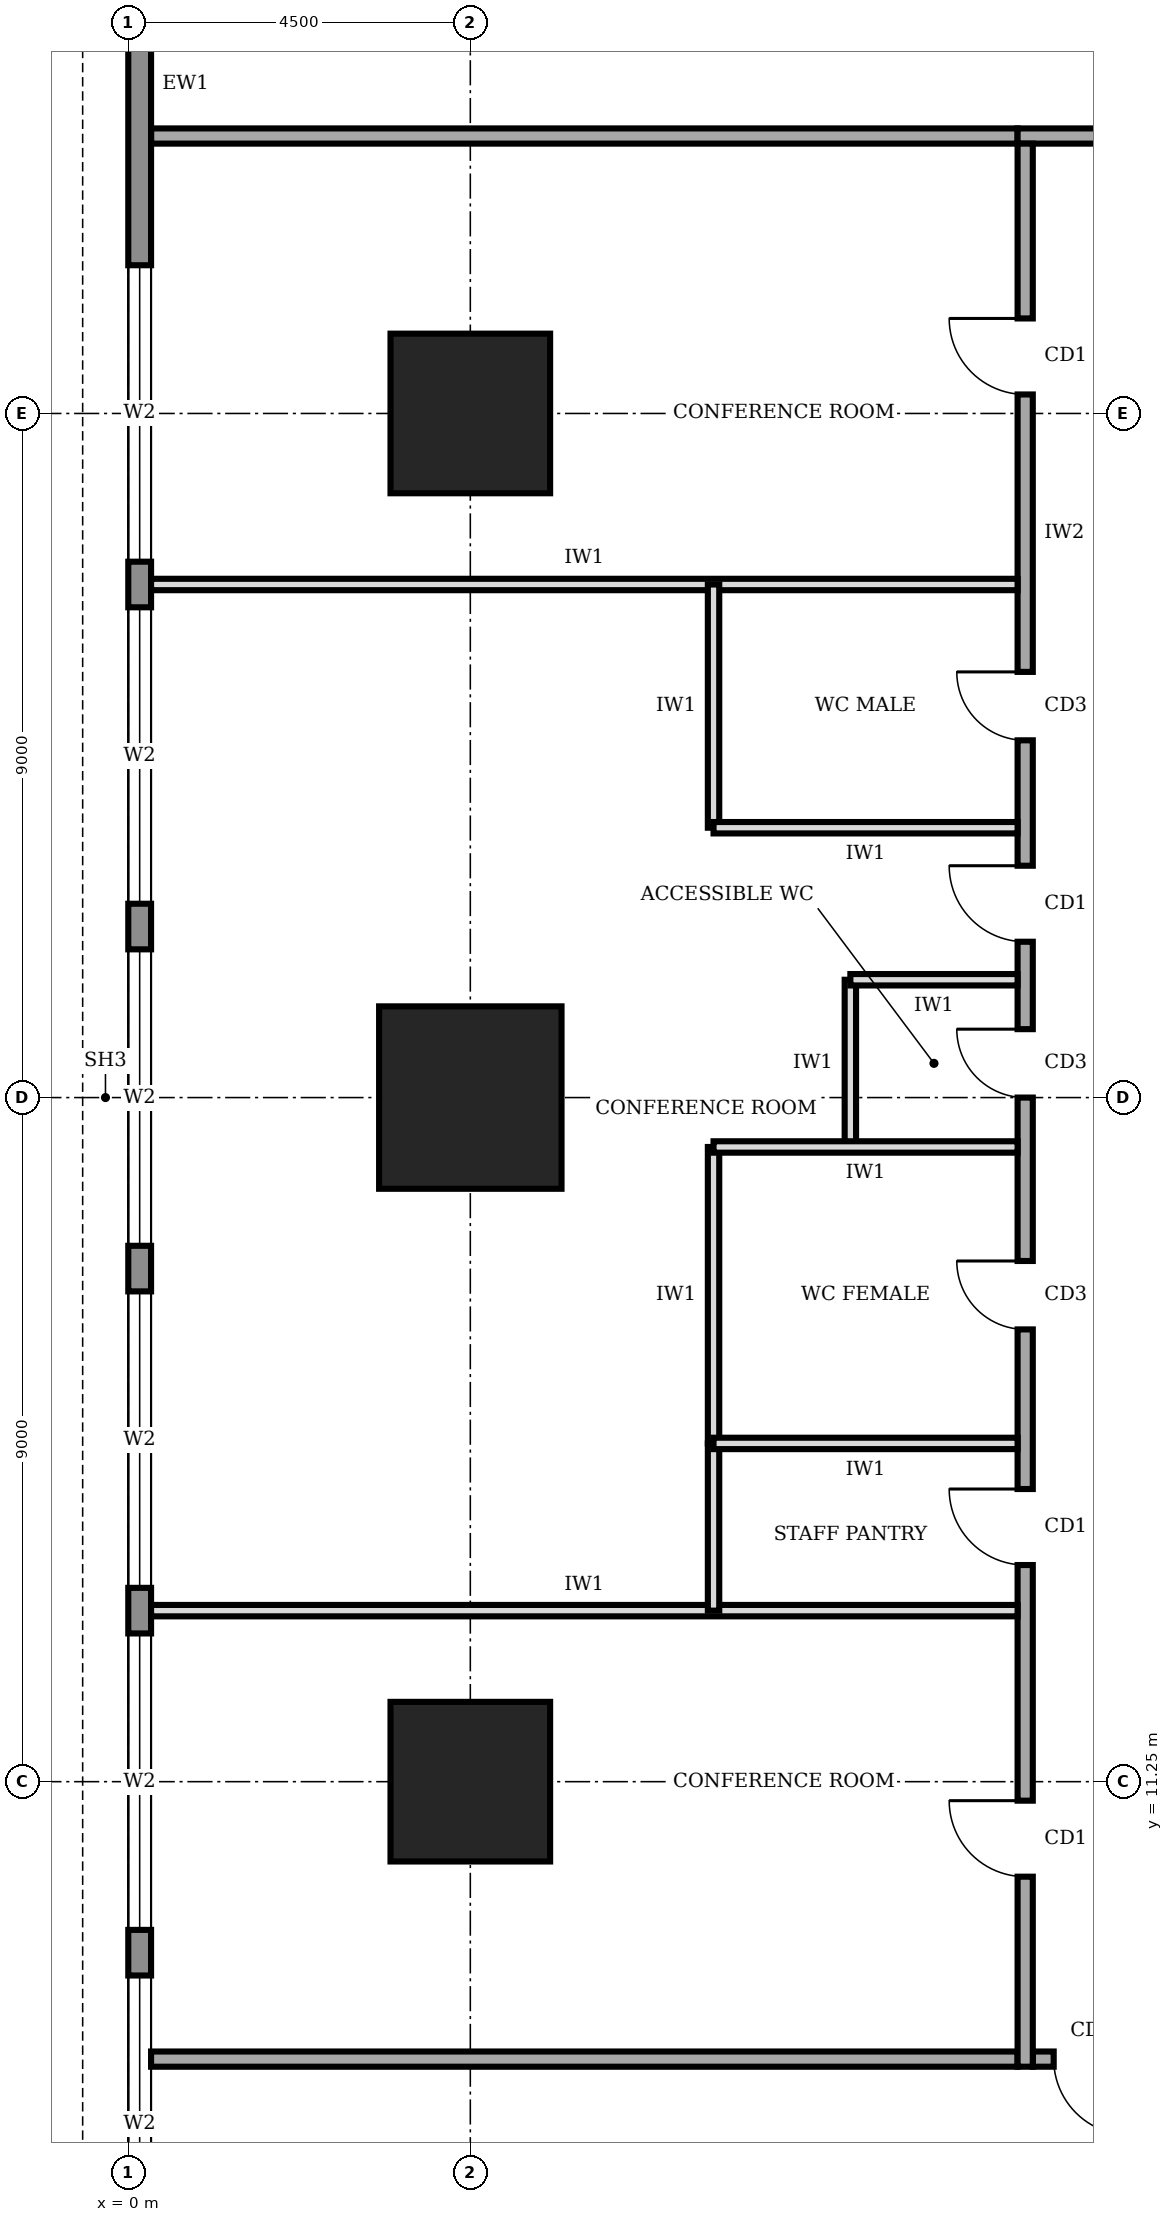
"""IFC4 building model, lengths in metres.
Left out: names, types, materials, properties, quantities, classifications, styles, units other than length and angle.
Written with IfcOpenShell. Run it as: python <this file> out.ifc"""

import sys

from ifc_helpers import new_model, si_unit, direction, frame, frame_2d, origin, origin_2d, place, context, subcontext, project, spatial, rectangle, extrude, element, fill, save


model = new_model("IFC4")
c1 = context("Model", 3, precision=1e-05, world=origin(), true_north=direction((0.0, 1.0)))
c2 = subcontext(c1, "Body", "Model", "MODEL_VIEW")
j1 = project(units=[si_unit("LENGTHUNIT", "METRE"), si_unit("PLANEANGLEUNIT", "RADIAN")], contexts=[c1])
p1 = place(None, origin())
s1 = spatial("IfcSite", under=j1, at=p1, CompositionType="ELEMENT")
p2 = place(p1, origin())
s2 = spatial("IfcBuilding", under=s1, at=p2, CompositionType="ELEMENT")
p3 = place(p2, frame((0.0, 0.0, 157.0)))
s3 = spatial("IfcBuildingStorey", under=s2, at=p3, CompositionType="ELEMENT", Elevation=157.0)
p4 = place(p3, frame((4.5, 11.25, 0.0), z_axis=(0.0, 0.0, 1.0), x_axis=(1.0, 0.0, 0.0)))
e1 = element("IfcColumn", 1, at=p4, inside=s3, PredefinedType="COLUMN", context=c2, shape_type="SweptSolid", body=[
    extrude(rectangle(XDim=2.1, YDim=2.1, at=origin_2d()), origin(), (0.0, 0.0, 1.0), 4.0),
])
p5 = place(p3, frame((4.5, 20.25, 0.0), z_axis=(0.0, 0.0, 1.0), x_axis=(1.0, 0.0, 0.0)))
e2 = element("IfcColumn", 2, at=p5, inside=s3, PredefinedType="COLUMN", context=c2, shape_type="SweptSolid", body=[
    extrude(rectangle(XDim=2.4, YDim=2.4, at=origin_2d()), origin(), (0.0, 0.0, 1.0), 4.0),
])
p6 = place(p3, frame((4.5, 29.25, 0.0), z_axis=(0.0, 0.0, 1.0), x_axis=(1.0, 0.0, 0.0)))
e3 = element("IfcColumn", 3, at=p6, inside=s3, PredefinedType="COLUMN", context=c2, shape_type="SweptSolid", body=[
    extrude(rectangle(XDim=2.1, YDim=2.1, at=origin_2d()), origin(), (0.0, 0.0, 1.0), 4.0),
])
p7 = place(p3, frame((0.15, 35.98, 0.0), z_axis=(0.0, 0.0, 1.0), x_axis=(0.0, -1.0, 0.0)))
e4 = element("IfcWall", 4, at=p7, inside=s3, PredefinedType="STANDARD", context=c2, shape_type="SweptSolid", body=[
    extrude(rectangle(XDim=31.46, YDim=0.3, at=frame_2d((15.73, 0.0))), origin(), (0.0, 0.0, 1.0), 3.75),
])
p8 = place(p7, frame((27.28, 0.0, 0.6)))
e5 = element("IfcOpeningElement", 5, at=p8, cuts=e4, PredefinedType="OPENING", context=c2, shape_type="SweptSolid", body=[
    extrude(rectangle(XDim=3.9, YDim=2.6, at=frame_2d((1.95, 1.3))), frame((0.0, 0.16, 0.0), z_axis=(0.0, -1.0, 0.0), x_axis=(1.0, 0.0, 0.0)), (0.0, 0.0, 1.0), 0.32),
])
p9 = place(p7, frame((22.78, 0.0, 0.6)))
e6 = element("IfcOpeningElement", 6, at=p9, cuts=e4, PredefinedType="OPENING", context=c2, shape_type="SweptSolid", body=[
    extrude(rectangle(XDim=3.9, YDim=2.6, at=frame_2d((1.95, 1.3))), frame((0.0, 0.16, 0.0), z_axis=(0.0, -1.0, 0.0), x_axis=(1.0, 0.0, 0.0)), (0.0, 0.0, 1.0), 0.32),
])
p10 = place(p7, frame((18.28, 0.0, 0.6)))
e7 = element("IfcOpeningElement", 7, at=p10, cuts=e4, PredefinedType="OPENING", context=c2, shape_type="SweptSolid", body=[
    extrude(rectangle(XDim=3.9, YDim=2.6, at=frame_2d((1.95, 1.3))), frame((0.0, 0.16, 0.0), z_axis=(0.0, -1.0, 0.0), x_axis=(1.0, 0.0, 0.0)), (0.0, 0.0, 1.0), 0.32),
])
p11 = place(p7, frame((13.78, 0.0, 0.6)))
e8 = element("IfcOpeningElement", 8, at=p11, cuts=e4, PredefinedType="OPENING", context=c2, shape_type="SweptSolid", body=[
    extrude(rectangle(XDim=3.9, YDim=2.6, at=frame_2d((1.95, 1.3))), frame((0.0, 0.16, 0.0), z_axis=(0.0, -1.0, 0.0), x_axis=(1.0, 0.0, 0.0)), (0.0, 0.0, 1.0), 0.32),
])
p12 = place(p7, frame((9.28, 0.0, 0.6)))
e9 = element("IfcOpeningElement", 9, at=p12, cuts=e4, PredefinedType="OPENING", context=c2, shape_type="SweptSolid", body=[
    extrude(rectangle(XDim=3.9, YDim=2.6, at=frame_2d((1.95, 1.3))), frame((0.0, 0.16, 0.0), z_axis=(0.0, -1.0, 0.0), x_axis=(1.0, 0.0, 0.0)), (0.0, 0.0, 1.0), 0.32),
])
p13 = place(p7, frame((4.78, 0.0, 0.6)))
e10 = element("IfcOpeningElement", 10, at=p13, cuts=e4, PredefinedType="OPENING", context=c2, shape_type="SweptSolid", body=[
    extrude(rectangle(XDim=3.9, YDim=2.6, at=frame_2d((1.95, 1.3))), frame((0.0, 0.16, 0.0), z_axis=(0.0, -1.0, 0.0), x_axis=(1.0, 0.0, 0.0)), (0.0, 0.0, 1.0), 0.32),
])
p14 = place(p3, frame((11.9, 7.6, 0.0), z_axis=(0.0, 0.0, 1.0), x_axis=(1.0, 0.0, 0.0)))
e11 = element("IfcWall", 11, at=p14, inside=s3, PredefinedType="SOLIDWALL", context=c2, shape_type="SweptSolid", body=[
    extrude(rectangle(XDim=28.3, YDim=0.2, at=frame_2d((14.15, 0.0))), origin(), (0.0, 0.0, 1.0), 3.75),
])
p15 = place(p14, frame((0.275, 0.0, 0.0)))
e12 = element("IfcOpeningElement", 12, at=p15, cuts=e11, PredefinedType="OPENING", context=c2, shape_type="SweptSolid", body=[
    extrude(rectangle(XDim=1.0, YDim=2.1, at=frame_2d((0.5, 1.05))), frame((0.0, 0.11, 0.0), z_axis=(0.0, -1.0, 0.0), x_axis=(1.0, 0.0, 0.0)), (0.0, 0.0, 1.0), 0.22),
])
p16 = place(p14, frame((14.35, 0.0, 0.0)))
e13 = element("IfcOpeningElement", 13, at=p16, cuts=e11, PredefinedType="OPENING", context=c2, shape_type="SweptSolid", body=[
    extrude(rectangle(XDim=1.4, YDim=2.1, at=frame_2d((0.7, 1.05))), frame((0.0, 0.11, 0.0), z_axis=(0.0, -1.0, 0.0), x_axis=(1.0, 0.0, 0.0)), (0.0, 0.0, 1.0), 0.22),
])
p17 = place(p3, frame((40.2, 32.9, 0.0), z_axis=(0.0, 0.0, 1.0), x_axis=(-1.0, 0.0, 0.0)))
e14 = element("IfcWall", 14, at=p17, inside=s3, PredefinedType="SOLIDWALL", context=c2, shape_type="SweptSolid", body=[
    extrude(rectangle(XDim=28.5, YDim=0.2, at=frame_2d((14.25, 0.0))), origin(), (0.0, 0.0, 1.0), 3.75),
])
p18 = place(p17, frame((24.55, 0.0, 0.0)))
e15 = element("IfcOpeningElement", 15, at=p18, cuts=e14, PredefinedType="OPENING", context=c2, shape_type="SweptSolid", body=[
    extrude(rectangle(XDim=1.8, YDim=2.1, at=frame_2d((0.9, 1.05))), frame((0.0, 0.11, 0.0), z_axis=(0.0, -1.0, 0.0), x_axis=(1.0, 0.0, 0.0)), (0.0, 0.0, 1.0), 0.22),
])
p19 = place(p17, frame((17.2, 0.0, 0.0)))
e16 = element("IfcOpeningElement", 16, at=p19, cuts=e14, PredefinedType="OPENING", context=c2, shape_type="SweptSolid", body=[
    extrude(rectangle(XDim=1.0, YDim=2.1, at=frame_2d((0.5, 1.05))), frame((0.0, 0.11, 0.0), z_axis=(0.0, -1.0, 0.0), x_axis=(1.0, 0.0, 0.0)), (0.0, 0.0, 1.0), 0.22),
])
p20 = place(p17, frame((6.0, 0.0, 0.0)))
e17 = element("IfcOpeningElement", 17, at=p20, cuts=e14, PredefinedType="OPENING", context=c2, shape_type="SweptSolid", body=[
    extrude(rectangle(XDim=1.0, YDim=2.1, at=frame_2d((0.5, 1.05))), frame((0.0, 0.11, 0.0), z_axis=(0.0, -1.0, 0.0), x_axis=(1.0, 0.0, 0.0)), (0.0, 0.0, 1.0), 0.22),
])
p21 = place(p3, frame((11.8, 32.8, 0.0), z_axis=(0.0, 0.0, 1.0), x_axis=(0.0, -1.0, 0.0)))
e18 = element("IfcWall", 18, at=p21, inside=s3, PredefinedType="SOLIDWALL", context=c2, shape_type="SweptSolid", body=[
    extrude(rectangle(XDim=25.3, YDim=0.2, at=frame_2d((12.65, 0.0))), origin(), (0.0, 0.0, 1.0), 3.75),
])
p22 = place(p21, frame((21.8, 0.0, 0.0)))
e19 = element("IfcOpeningElement", 19, at=p22, cuts=e18, PredefinedType="OPENING", context=c2, shape_type="SweptSolid", body=[
    extrude(rectangle(XDim=1.0, YDim=2.1, at=frame_2d((0.5, 1.05))), frame((0.0, 0.11, 0.0), z_axis=(0.0, -1.0, 0.0), x_axis=(1.0, 0.0, 0.0)), (0.0, 0.0, 1.0), 0.22),
])
p23 = place(p21, frame((17.7, 0.0, 0.0)))
e20 = element("IfcOpeningElement", 20, at=p23, cuts=e18, PredefinedType="OPENING", context=c2, shape_type="SweptSolid", body=[
    extrude(rectangle(XDim=1.0, YDim=2.1, at=frame_2d((0.5, 1.05))), frame((0.0, 0.11, 0.0), z_axis=(0.0, -1.0, 0.0), x_axis=(1.0, 0.0, 0.0)), (0.0, 0.0, 1.0), 0.22),
])
p24 = place(p21, frame((14.7, 0.0, 0.0)))
e21 = element("IfcOpeningElement", 21, at=p24, cuts=e18, PredefinedType="OPENING", context=c2, shape_type="SweptSolid", body=[
    extrude(rectangle(XDim=0.9, YDim=2.1, at=frame_2d((0.45, 1.05))), frame((0.0, 0.11, 0.0), z_axis=(0.0, -1.0, 0.0), x_axis=(1.0, 0.0, 0.0)), (0.0, 0.0, 1.0), 0.22),
])
p25 = place(p21, frame((11.65, 0.0, 0.0)))
e22 = element("IfcOpeningElement", 22, at=p25, cuts=e18, PredefinedType="OPENING", context=c2, shape_type="SweptSolid", body=[
    extrude(rectangle(XDim=0.9, YDim=2.1, at=frame_2d((0.45, 1.05))), frame((0.0, 0.11, 0.0), z_axis=(0.0, -1.0, 0.0), x_axis=(1.0, 0.0, 0.0)), (0.0, 0.0, 1.0), 0.22),
])
p26 = place(p21, frame((6.95, 0.0, 0.0)))
e23 = element("IfcOpeningElement", 23, at=p26, cuts=e18, PredefinedType="OPENING", context=c2, shape_type="SweptSolid", body=[
    extrude(rectangle(XDim=0.9, YDim=2.1, at=frame_2d((0.45, 1.05))), frame((0.0, 0.11, 0.0), z_axis=(0.0, -1.0, 0.0), x_axis=(1.0, 0.0, 0.0)), (0.0, 0.0, 1.0), 0.22),
])
p27 = place(p21, frame((9.5, 0.0, 0.0)))
e24 = element("IfcOpeningElement", 24, at=p27, cuts=e18, PredefinedType="OPENING", context=c2, shape_type="SweptSolid", body=[
    extrude(rectangle(XDim=1.0, YDim=2.1, at=frame_2d((0.5, 1.05))), frame((0.0, 0.11, 0.0), z_axis=(0.0, -1.0, 0.0), x_axis=(1.0, 0.0, 0.0)), (0.0, 0.0, 1.0), 0.22),
])
p28 = place(p21, frame((2.3, 0.0, 0.0)))
e25 = element("IfcOpeningElement", 25, at=p28, cuts=e18, PredefinedType="OPENING", context=c2, shape_type="SweptSolid", body=[
    extrude(rectangle(XDim=1.0, YDim=2.1, at=frame_2d((0.5, 1.05))), frame((0.0, 0.11, 0.0), z_axis=(0.0, -1.0, 0.0), x_axis=(1.0, 0.0, 0.0)), (0.0, 0.0, 1.0), 0.22),
])
for number, where, z_axis, x_axis in (
    (26, (0.3, 7.6, 0.0), (0.0, 0.0, 1.0), (1.0, 0.0, 0.0)),
    (27, (0.3, 32.9, 0.0), (0.0, 0.0, 1.0), (1.0, 0.0, 0.0)),
):
    element("IfcWall", number, at=place(p3, frame(where, z_axis=z_axis, x_axis=x_axis)), inside=s3, PredefinedType="SOLIDWALL", context=c2, shape_type="SweptSolid", body=[
        extrude(rectangle(XDim=11.4, YDim=0.2, at=frame_2d((5.7, 0.0))), origin(), (0.0, 0.0, 1.0), 3.75),
    ])
for number, where, z_axis, x_axis in (
    (28, (0.3, 13.5, 0.0), (0.0, 0.0, 1.0), (1.0, 0.0, 0.0)),
    (29, (0.3, 27.0, 0.0), (0.0, 0.0, 1.0), (1.0, 0.0, 0.0)),
):
    element("IfcWall", number, at=place(p3, frame(where, z_axis=z_axis, x_axis=x_axis)), inside=s3, PredefinedType="PARTITIONING", context=c2, shape_type="SweptSolid", body=[
        extrude(rectangle(XDim=11.4, YDim=0.15, at=frame_2d((5.7, 0.0))), origin(), (0.0, 0.0, 1.0), 3.75),
    ])
p29 = place(p3, frame((11.7, 15.7, 0.0), z_axis=(0.0, 0.0, 1.0), x_axis=(-1.0, 0.0, 0.0)))
e30 = element("IfcWall", 30, at=p29, inside=s3, PredefinedType="PARTITIONING", context=c2, shape_type="SweptSolid", body=[
    extrude(rectangle(XDim=4.0, YDim=0.15, at=frame_2d((2.0, 0.0))), origin(), (0.0, 0.0, 1.0), 3.75),
])
p30 = place(p3, frame((11.7, 19.6, 0.0), z_axis=(0.0, 0.0, 1.0), x_axis=(-1.0, 0.0, 0.0)))
e31 = element("IfcWall", 31, at=p30, inside=s3, PredefinedType="PARTITIONING", context=c2, shape_type="SweptSolid", body=[
    extrude(rectangle(XDim=4.0, YDim=0.15, at=frame_2d((2.0, 0.0))), origin(), (0.0, 0.0, 1.0), 2.85),
])
p31 = place(p3, frame((11.7, 21.8, 0.0), z_axis=(0.0, 0.0, 1.0), x_axis=(-1.0, 0.0, 0.0)))
e32 = element("IfcWall", 32, at=p31, inside=s3, PredefinedType="PARTITIONING", context=c2, shape_type="SweptSolid", body=[
    extrude(rectangle(XDim=2.2, YDim=0.15, at=frame_2d((1.1, 0.0))), origin(), (0.0, 0.0, 1.0), 3.75),
])
p32 = place(p3, frame((11.7, 23.8, 0.0), z_axis=(0.0, 0.0, 1.0), x_axis=(-1.0, 0.0, 0.0)))
e33 = element("IfcWall", 33, at=p32, inside=s3, PredefinedType="PARTITIONING", context=c2, shape_type="SweptSolid", body=[
    extrude(rectangle(XDim=4.0, YDim=0.15, at=frame_2d((2.0, 0.0))), origin(), (0.0, 0.0, 1.0), 3.75),
])
p33 = place(p3, frame((7.7, 13.5, 0.0), z_axis=(0.0, 0.0, 1.0), x_axis=(0.0, 1.0, 0.0)))
e34 = element("IfcWall", 34, at=p33, inside=s3, PredefinedType="PARTITIONING", context=c2, shape_type="SweptSolid", body=[
    extrude(rectangle(XDim=2.2, YDim=0.15, at=frame_2d((1.1, 0.0))), origin(), (0.0, 0.0, 1.0), 3.75),
])
p34 = place(p3, frame((7.7, 15.7, 0.0), z_axis=(0.0, 0.0, 1.0), x_axis=(0.0, 1.0, 0.0)))
e35 = element("IfcWall", 35, at=p34, inside=s3, PredefinedType="PARTITIONING", context=c2, shape_type="SweptSolid", body=[
    extrude(rectangle(XDim=3.9, YDim=0.15, at=frame_2d((1.95, 0.0))), origin(), (0.0, 0.0, 1.0), 3.75),
])
p35 = place(p3, frame((9.5, 19.6, 0.0), z_axis=(0.0, 0.0, 1.0), x_axis=(0.0, 1.0, 0.0)))
e36 = element("IfcWall", 36, at=p35, inside=s3, PredefinedType="PARTITIONING", context=c2, shape_type="SweptSolid", body=[
    extrude(rectangle(XDim=2.2, YDim=0.15, at=frame_2d((1.1, 0.0))), origin(), (0.0, 0.0, 1.0), 3.75),
])
p36 = place(p3, frame((7.7, 23.8, 0.0), z_axis=(0.0, 0.0, 1.0), x_axis=(0.0, 1.0, 0.0)))
e37 = element("IfcWall", 37, at=p36, inside=s3, PredefinedType="PARTITIONING", context=c2, shape_type="SweptSolid", body=[
    extrude(rectangle(XDim=3.2, YDim=0.15, at=frame_2d((1.6, 0.0))), origin(), (0.0, 0.0, 1.0), 3.75),
])
p37 = place(p8, origin())
e38 = element("IfcWindow", 38, at=p37, inside=s3, PartitioningType="SINGLE_PANEL", PredefinedType="WINDOW", context=c2, shape_type="SweptSolid", body=[
    extrude(rectangle(XDim=3.9, YDim=2.6, at=frame_2d((1.95, 1.3))), frame((0.0, 0.03, 0.0), z_axis=(0.0, -1.0, 0.0), x_axis=(1.0, 0.0, 0.0)), (0.0, 0.0, 1.0), 0.06),
])
fill(e5, e38)
p38 = place(p9, origin())
e39 = element("IfcWindow", 39, at=p38, inside=s3, PartitioningType="SINGLE_PANEL", PredefinedType="WINDOW", context=c2, shape_type="SweptSolid", body=[
    extrude(rectangle(XDim=3.9, YDim=2.6, at=frame_2d((1.95, 1.3))), frame((0.0, 0.03, 0.0), z_axis=(0.0, -1.0, 0.0), x_axis=(1.0, 0.0, 0.0)), (0.0, 0.0, 1.0), 0.06),
])
fill(e6, e39)
p39 = place(p10, origin())
e40 = element("IfcWindow", 40, at=p39, inside=s3, PartitioningType="SINGLE_PANEL", PredefinedType="WINDOW", context=c2, shape_type="SweptSolid", body=[
    extrude(rectangle(XDim=3.9, YDim=2.6, at=frame_2d((1.95, 1.3))), frame((0.0, 0.03, 0.0), z_axis=(0.0, -1.0, 0.0), x_axis=(1.0, 0.0, 0.0)), (0.0, 0.0, 1.0), 0.06),
])
fill(e7, e40)
p40 = place(p11, origin())
e41 = element("IfcWindow", 41, at=p40, inside=s3, PartitioningType="SINGLE_PANEL", PredefinedType="WINDOW", context=c2, shape_type="SweptSolid", body=[
    extrude(rectangle(XDim=3.9, YDim=2.6, at=frame_2d((1.95, 1.3))), frame((0.0, 0.03, 0.0), z_axis=(0.0, -1.0, 0.0), x_axis=(1.0, 0.0, 0.0)), (0.0, 0.0, 1.0), 0.06),
])
fill(e8, e41)
p41 = place(p12, origin())
e42 = element("IfcWindow", 42, at=p41, inside=s3, PartitioningType="SINGLE_PANEL", PredefinedType="WINDOW", context=c2, shape_type="SweptSolid", body=[
    extrude(rectangle(XDim=3.9, YDim=2.6, at=frame_2d((1.95, 1.3))), frame((0.0, 0.03, 0.0), z_axis=(0.0, -1.0, 0.0), x_axis=(1.0, 0.0, 0.0)), (0.0, 0.0, 1.0), 0.06),
])
fill(e9, e42)
p42 = place(p13, origin())
e43 = element("IfcWindow", 43, at=p42, inside=s3, PartitioningType="SINGLE_PANEL", PredefinedType="WINDOW", context=c2, shape_type="SweptSolid", body=[
    extrude(rectangle(XDim=3.9, YDim=2.6, at=frame_2d((1.95, 1.3))), frame((0.0, 0.03, 0.0), z_axis=(0.0, -1.0, 0.0), x_axis=(1.0, 0.0, 0.0)), (0.0, 0.0, 1.0), 0.06),
])
fill(e10, e43)
p43 = place(p15, frame((1.0, 0.0, 0.0), z_axis=(0.0, 0.0, 1.0), x_axis=(-1.0, 0.0, 0.0)))
e44 = element("IfcDoor", 44, at=p43, inside=s3, OperationType="SINGLE_SWING_LEFT", PredefinedType="DOOR", context=c2, shape_type="SweptSolid", body=[
    extrude(rectangle(XDim=1.0, YDim=2.1, at=frame_2d((0.5, 1.05))), frame((0.0, 0.025, 0.0), z_axis=(0.0, -1.0, 0.0), x_axis=(1.0, 0.0, 0.0)), (0.0, 0.0, 1.0), 0.05),
])
fill(e12, e44)
p44 = place(p22, frame((1.0, 0.0, 0.0), z_axis=(0.0, 0.0, 1.0), x_axis=(-1.0, 0.0, 0.0)))
e45 = element("IfcDoor", 45, at=p44, inside=s3, OperationType="SINGLE_SWING_RIGHT", PredefinedType="DOOR", context=c2, shape_type="SweptSolid", body=[
    extrude(rectangle(XDim=1.0, YDim=2.1, at=frame_2d((0.5, 1.05))), frame((0.0, 0.025, 0.0), z_axis=(0.0, -1.0, 0.0), x_axis=(1.0, 0.0, 0.0)), (0.0, 0.0, 1.0), 0.05),
])
fill(e19, e45)
p45 = place(p23, frame((1.0, 0.0, 0.0), z_axis=(0.0, 0.0, 1.0), x_axis=(-1.0, 0.0, 0.0)))
e46 = element("IfcDoor", 46, at=p45, inside=s3, OperationType="SINGLE_SWING_RIGHT", PredefinedType="DOOR", context=c2, shape_type="SweptSolid", body=[
    extrude(rectangle(XDim=1.0, YDim=2.1, at=frame_2d((0.5, 1.05))), frame((0.0, 0.025, 0.0), z_axis=(0.0, -1.0, 0.0), x_axis=(1.0, 0.0, 0.0)), (0.0, 0.0, 1.0), 0.05),
])
fill(e20, e46)
p46 = place(p24, frame((0.9, 0.0, 0.0), z_axis=(0.0, 0.0, 1.0), x_axis=(-1.0, 0.0, 0.0)))
e47 = element("IfcDoor", 47, at=p46, inside=s3, OperationType="SINGLE_SWING_RIGHT", PredefinedType="DOOR", context=c2, shape_type="SweptSolid", body=[
    extrude(rectangle(XDim=0.9, YDim=2.1, at=frame_2d((0.45, 1.05))), frame((0.0, 0.025, 0.0), z_axis=(0.0, -1.0, 0.0), x_axis=(1.0, 0.0, 0.0)), (0.0, 0.0, 1.0), 0.05),
])
fill(e21, e47)
p47 = place(p25, frame((0.9, 0.0, 0.0), z_axis=(0.0, 0.0, 1.0), x_axis=(-1.0, 0.0, 0.0)))
e48 = element("IfcDoor", 48, at=p47, inside=s3, OperationType="SINGLE_SWING_RIGHT", PredefinedType="DOOR", context=c2, shape_type="SweptSolid", body=[
    extrude(rectangle(XDim=0.9, YDim=2.1, at=frame_2d((0.45, 1.05))), frame((0.0, 0.025, 0.0), z_axis=(0.0, -1.0, 0.0), x_axis=(1.0, 0.0, 0.0)), (0.0, 0.0, 1.0), 0.05),
])
fill(e22, e48)
p48 = place(p26, frame((0.9, 0.0, 0.0), z_axis=(0.0, 0.0, 1.0), x_axis=(-1.0, 0.0, 0.0)))
e49 = element("IfcDoor", 49, at=p48, inside=s3, OperationType="SINGLE_SWING_RIGHT", PredefinedType="DOOR", context=c2, shape_type="SweptSolid", body=[
    extrude(rectangle(XDim=0.9, YDim=2.1, at=frame_2d((0.45, 1.05))), frame((0.0, 0.025, 0.0), z_axis=(0.0, -1.0, 0.0), x_axis=(1.0, 0.0, 0.0)), (0.0, 0.0, 1.0), 0.05),
])
fill(e23, e49)
p49 = place(p27, frame((1.0, 0.0, 0.0), z_axis=(0.0, 0.0, 1.0), x_axis=(-1.0, 0.0, 0.0)))
e50 = element("IfcDoor", 50, at=p49, inside=s3, OperationType="SINGLE_SWING_RIGHT", PredefinedType="DOOR", context=c2, shape_type="SweptSolid", body=[
    extrude(rectangle(XDim=1.0, YDim=2.1, at=frame_2d((0.5, 1.05))), frame((0.0, 0.025, 0.0), z_axis=(0.0, -1.0, 0.0), x_axis=(1.0, 0.0, 0.0)), (0.0, 0.0, 1.0), 0.05),
])
fill(e24, e50)
p50 = place(p28, frame((1.0, 0.0, 0.0), z_axis=(0.0, 0.0, 1.0), x_axis=(-1.0, 0.0, 0.0)))
e51 = element("IfcDoor", 51, at=p50, inside=s3, OperationType="SINGLE_SWING_RIGHT", PredefinedType="DOOR", context=c2, shape_type="SweptSolid", body=[
    extrude(rectangle(XDim=1.0, YDim=2.1, at=frame_2d((0.5, 1.05))), frame((0.0, 0.025, 0.0), z_axis=(0.0, -1.0, 0.0), x_axis=(1.0, 0.0, 0.0)), (0.0, 0.0, 1.0), 0.05),
])
fill(e25, e51)
save(model, sys.argv[1])
